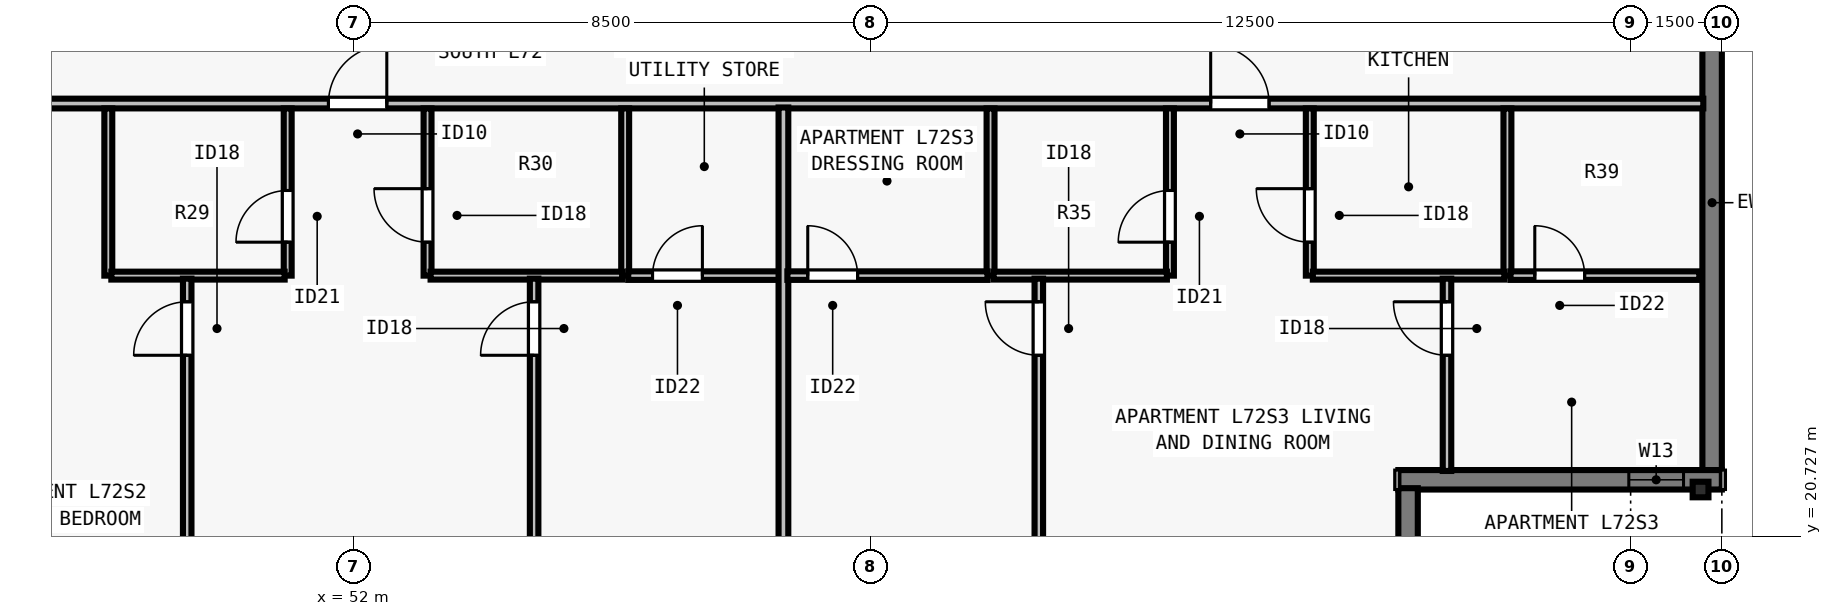
"""IFC4 building model, lengths in metres.
Left out: names, types, materials, properties, quantities, classifications, styles, units other than length and angle.
Written with IfcOpenShell. Run it as: python <this file> out.ifc"""

import sys

from ifc_helpers import new_model, si_unit, direction, frame, frame_2d, origin, origin_2d, place, context, subcontext, project, spatial, rectangle, i_section, extrude, element, fill, save


model = new_model("IFC4")
c1 = context("Model", 3, precision=1e-05, world=origin(), true_north=direction((0.0, 1.0)))
c2 = subcontext(c1, "Body", "Model", "MODEL_VIEW")
j1 = project(units=[si_unit("LENGTHUNIT", "METRE"), si_unit("PLANEANGLEUNIT", "RADIAN")], contexts=[c1])
p1 = place(None, origin())
s1 = spatial("IfcSite", under=j1, at=p1, CompositionType="ELEMENT")
p2 = place(p1, origin())
s2 = spatial("IfcBuilding", under=s1, at=p2, CompositionType="ELEMENT")
p3 = place(p2, frame((0.0, 0.0, 262.0)))
s3 = spatial("IfcBuildingStorey", under=s2, at=p3, CompositionType="ELEMENT", Elevation=262.0)
p4 = place(p3, frame((74.15, 21.5, 0.0), z_axis=(0.0, 0.0, 1.0), x_axis=(0.0, 1.0, 0.0)))
e1 = element("IfcColumn", 1, at=p4, inside=s3, PredefinedType="COLUMN", context=c2, shape_type="SweptSolid", body=[
    extrude(i_section(OverallWidth=0.256, OverallDepth=0.26, WebThickness=0.01, FlangeThickness=0.017, FilletRadius=0.013, at=origin_2d()), origin(), (0.0, 0.0, 1.0), 3.5),
])
p5 = place(p3, frame((74.34, 56.5, 0.0), z_axis=(0.0, 0.0, 1.0), x_axis=(0.0, -1.0, 0.0)))
e2 = element("IfcWall", 2, at=p5, inside=s3, PredefinedType="SOLIDWALL", context=c2, shape_type="SweptSolid", body=[
    extrude(rectangle(XDim=34.702, YDim=0.32, at=frame_2d((17.351, 0.0))), origin(), (0.0, 0.0, 1.0), 3.29),
])
p6 = place(p5, frame((6.738, 0.0, 0.8)))
e3 = element("IfcOpeningElement", 3, at=p6, cuts=e2, PredefinedType="OPENING", context=c2, shape_type="SweptSolid", body=[
    extrude(rectangle(XDim=1.85, YDim=1.678, at=frame_2d((0.925, 0.839))), frame((0.0, 0.17, 0.0), z_axis=(0.0, -1.0, 0.0), x_axis=(1.0, 0.0, 0.0)), (0.0, 0.0, 1.0), 0.34),
])
p7 = place(p5, frame((10.263, 0.0, 0.8)))
e4 = element("IfcOpeningElement", 4, at=p7, cuts=e2, PredefinedType="OPENING", context=c2, shape_type="SweptSolid", body=[
    extrude(rectangle(XDim=1.55, YDim=1.678, at=frame_2d((0.775, 0.839))), frame((0.0, 0.17, 0.0), z_axis=(0.0, -1.0, 0.0), x_axis=(1.0, 0.0, 0.0)), (0.0, 0.0, 1.0), 0.34),
])
p8 = place(p5, frame((18.264, 0.0, 0.8)))
e5 = element("IfcOpeningElement", 5, at=p8, cuts=e2, PredefinedType="OPENING", context=c2, shape_type="SweptSolid", body=[
    extrude(rectangle(XDim=1.55, YDim=1.678, at=frame_2d((0.775, 0.839))), frame((0.0, 0.17, 0.0), z_axis=(0.0, -1.0, 0.0), x_axis=(1.0, 0.0, 0.0)), (0.0, 0.0, 1.0), 0.34),
])
p9 = place(p5, frame((24.164, 0.0, 0.8)))
e6 = element("IfcOpeningElement", 6, at=p9, cuts=e2, PredefinedType="OPENING", context=c2, shape_type="SweptSolid", body=[
    extrude(rectangle(XDim=1.55, YDim=1.678, at=frame_2d((0.775, 0.839))), frame((0.0, 0.17, 0.0), z_axis=(0.0, -1.0, 0.0), x_axis=(1.0, 0.0, 0.0)), (0.0, 0.0, 1.0), 0.34),
])
p10 = place(p5, frame((14.39, 0.0, 0.8)))
e7 = element("IfcOpeningElement", 7, at=p10, cuts=e2, PredefinedType="OPENING", context=c2, shape_type="SweptSolid", body=[
    extrude(rectangle(XDim=0.9, YDim=1.678, at=frame_2d((0.45, 0.839))), frame((0.0, 0.17, 0.0), z_axis=(0.0, -1.0, 0.0), x_axis=(1.0, 0.0, 0.0)), (0.0, 0.0, 1.0), 0.34),
])
p11 = place(p3, frame((74.5, 21.66, 0.0), z_axis=(0.0, 0.0, 1.0), x_axis=(-1.0, 0.0, 0.0)))
e8 = element("IfcWall", 8, at=p11, inside=s3, PredefinedType="SOLIDWALL", context=c2, shape_type="SweptSolid", body=[
    extrude(rectangle(XDim=5.32, YDim=0.32, at=frame_2d((2.66, 0.0))), origin(), (0.0, 0.0, 1.0), 3.29),
])
p12 = place(p11, frame((0.63, 0.0, 0.8)))
e9 = element("IfcOpeningElement", 9, at=p12, cuts=e8, PredefinedType="OPENING", context=c2, shape_type="SweptSolid", body=[
    extrude(rectangle(XDim=0.9, YDim=1.678, at=frame_2d((0.45, 0.839))), frame((0.0, 0.17, 0.0), z_axis=(0.0, -1.0, 0.0), x_axis=(1.0, 0.0, 0.0)), (0.0, 0.0, 1.0), 0.34),
])
p13 = place(p3, frame((69.34, 21.522, 0.0), z_axis=(0.0, 0.0, 1.0), x_axis=(0.0, -1.0, 0.0)))
e10 = element("IfcWall", 10, at=p13, inside=s3, PredefinedType="SOLIDWALL", context=c2, shape_type="SweptSolid", body=[
    extrude(rectangle(XDim=4.724, YDim=0.32, at=frame_2d((2.362, 0.0))), origin(), (0.0, 0.0, 1.0), 3.29),
])
p14 = place(p3, frame((29.805, 27.847, 0.0), z_axis=(0.0, 0.0, 1.0), x_axis=(1.0, 0.0, 0.0)))
e11 = element("IfcWall", 11, at=p14, inside=s3, PredefinedType="PARTITIONING", context=c2, shape_type="SweptSolid", body=[
    extrude(rectangle(XDim=44.39, YDim=0.16, at=frame_2d((22.195, 0.0))), origin(), (0.0, 0.0, 1.0), 2.958),
])
p15 = place(p14, frame((7.206, 0.0, 0.0)))
e12 = element("IfcOpeningElement", 12, at=p15, cuts=e11, PredefinedType="OPENING", context=c2, shape_type="SweptSolid", body=[
    extrude(rectangle(XDim=0.96, YDim=2.18, at=frame_2d((0.48, 1.09))), frame((0.0, 0.09, 0.0), z_axis=(0.0, -1.0, 0.0), x_axis=(1.0, 0.0, 0.0)), (0.0, 0.0, 1.0), 0.18),
])
p16 = place(p14, frame((21.78, 0.0, 0.0)))
e13 = element("IfcOpeningElement", 13, at=p16, cuts=e11, PredefinedType="OPENING", context=c2, shape_type="SweptSolid", body=[
    extrude(rectangle(XDim=0.96, YDim=2.18, at=frame_2d((0.48, 1.09))), frame((0.0, 0.09, 0.0), z_axis=(0.0, -1.0, 0.0), x_axis=(1.0, 0.0, 0.0)), (0.0, 0.0, 1.0), 0.18),
])
p17 = place(p14, frame((36.289, 0.0, 0.0)))
e14 = element("IfcOpeningElement", 14, at=p17, cuts=e11, PredefinedType="OPENING", context=c2, shape_type="SweptSolid", body=[
    extrude(rectangle(XDim=0.96, YDim=2.18, at=frame_2d((0.48, 1.09))), frame((0.0, 0.09, 0.0), z_axis=(0.0, -1.0, 0.0), x_axis=(1.0, 0.0, 0.0)), (0.0, 0.0, 1.0), 0.18),
])
p18 = place(p3, frame((47.965, 25.018, 0.0), z_axis=(0.0, 0.0, 1.0), x_axis=(0.0, 1.0, 0.0)))
e15 = element("IfcWall", 15, at=p18, inside=s3, PredefinedType="PLUMBINGWALL", context=c2, shape_type="SweptSolid", body=[
    extrude(rectangle(XDim=2.75, YDim=0.13, at=frame_2d((1.375, 0.0))), origin(), (0.0, 0.0, 1.0), 3.29),
])
p19 = place(p3, frame((50.915, 25.018, 0.0), z_axis=(0.0, 0.0, 1.0), x_axis=(0.0, 1.0, 0.0)))
e16 = element("IfcWall", 16, at=p19, inside=s3, PredefinedType="PLUMBINGWALL", context=c2, shape_type="SweptSolid", body=[
    extrude(rectangle(XDim=2.75, YDim=0.13, at=frame_2d((1.375, 0.0))), origin(), (0.0, 0.0, 1.0), 3.29),
])
p20 = place(p19, frame((0.55, 0.0, 0.0)))
e17 = element("IfcOpeningElement", 17, at=p20, cuts=e16, PredefinedType="OPENING", context=c2, shape_type="SweptSolid", body=[
    extrude(rectangle(XDim=0.85, YDim=2.08, at=frame_2d((0.425, 1.04))), frame((0.0, 0.075, 0.0), z_axis=(0.0, -1.0, 0.0), x_axis=(1.0, 0.0, 0.0)), (0.0, 0.0, 1.0), 0.15),
])
p21 = place(p3, frame((48.015, 25.018, 0.0), z_axis=(0.0, 0.0, 1.0), x_axis=(1.0, 0.0, 0.0)))
e18 = element("IfcWall", 18, at=p21, inside=s3, PredefinedType="PLUMBINGWALL", context=c2, shape_type="SweptSolid", body=[
    extrude(rectangle(XDim=2.85, YDim=0.13, at=frame_2d((1.425, 0.0))), origin(), (0.0, 0.0, 1.0), 3.29),
])
p22 = place(p3, frame((56.465, 25.018, 0.0), z_axis=(0.0, 0.0, 1.0), x_axis=(0.0, 1.0, 0.0)))
e19 = element("IfcWall", 19, at=p22, inside=s3, PredefinedType="PLUMBINGWALL", context=c2, shape_type="SweptSolid", body=[
    extrude(rectangle(XDim=2.75, YDim=0.13, at=frame_2d((1.375, 0.0))), origin(), (0.0, 0.0, 1.0), 3.29),
])
p23 = place(p3, frame((53.215, 25.018, 0.0), z_axis=(0.0, 0.0, 1.0), x_axis=(0.0, 1.0, 0.0)))
e20 = element("IfcWall", 20, at=p23, inside=s3, PredefinedType="PLUMBINGWALL", context=c2, shape_type="SweptSolid", body=[
    extrude(rectangle(XDim=2.75, YDim=0.13, at=frame_2d((1.375, 0.0))), origin(), (0.0, 0.0, 1.0), 2.958),
])
p24 = place(p23, frame((0.55, 0.0, 0.0)))
e21 = element("IfcOpeningElement", 21, at=p24, cuts=e20, PredefinedType="OPENING", context=c2, shape_type="SweptSolid", body=[
    extrude(rectangle(XDim=0.88, YDim=2.1, at=frame_2d((0.44, 1.05))), frame((0.0, 0.075, 0.0), z_axis=(0.0, -1.0, 0.0), x_axis=(1.0, 0.0, 0.0)), (0.0, 0.0, 1.0), 0.15),
])
p25 = place(p3, frame((53.265, 25.018, 0.0), z_axis=(0.0, 0.0, 1.0), x_axis=(1.0, 0.0, 0.0)))
e22 = element("IfcWall", 22, at=p25, inside=s3, PredefinedType="PLUMBINGWALL", context=c2, shape_type="SweptSolid", body=[
    extrude(rectangle(XDim=3.15, YDim=0.13, at=frame_2d((1.575, 0.0))), origin(), (0.0, 0.0, 1.0), 3.29),
])
p26 = place(p3, frame((49.262, 16.88, 0.0), z_axis=(0.0, 0.0, 1.0), x_axis=(0.0, 1.0, 0.0)))
e23 = element("IfcWall", 23, at=p26, inside=s3, PredefinedType="PARTITIONING", context=c2, shape_type="SweptSolid", body=[
    extrude(rectangle(XDim=8.088, YDim=0.14, at=frame_2d((4.044, 0.0))), origin(), (0.0, 0.0, 1.0), 2.958),
])
p27 = place(p26, frame((6.827, 0.0, 0.0)))
e24 = element("IfcOpeningElement", 24, at=p27, cuts=e23, PredefinedType="OPENING", context=c2, shape_type="SweptSolid", body=[
    extrude(rectangle(XDim=0.88, YDim=2.1, at=frame_2d((0.44, 1.05))), frame((0.0, 0.08, 0.0), z_axis=(0.0, -1.0, 0.0), x_axis=(1.0, 0.0, 0.0)), (0.0, 0.0, 1.0), 0.16),
])
p28 = place(p3, frame((54.968, 16.88, 0.0), z_axis=(0.0, 0.0, 1.0), x_axis=(0.0, 1.0, 0.0)))
e25 = element("IfcWall", 25, at=p28, inside=s3, PredefinedType="PARTITIONING", context=c2, shape_type="SweptSolid", body=[
    extrude(rectangle(XDim=8.088, YDim=0.14, at=frame_2d((4.044, 0.0))), origin(), (0.0, 0.0, 1.0), 3.29),
])
p29 = place(p28, frame((6.827, 0.0, 0.0)))
e26 = element("IfcOpeningElement", 26, at=p29, cuts=e25, PredefinedType="OPENING", context=c2, shape_type="SweptSolid", body=[
    extrude(rectangle(XDim=0.88, YDim=2.1, at=frame_2d((0.44, 1.05))), frame((0.0, 0.08, 0.0), z_axis=(0.0, -1.0, 0.0), x_axis=(1.0, 0.0, 0.0)), (0.0, 0.0, 1.0), 0.16),
])
p30 = place(p3, frame((56.515, 25.018, 0.0), z_axis=(0.0, 0.0, 1.0), x_axis=(1.0, 0.0, 0.0)))
e27 = element("IfcWall", 27, at=p30, inside=s3, PredefinedType="PARTITIONING", context=c2, shape_type="SweptSolid", body=[
    extrude(rectangle(XDim=2.603, YDim=0.14, at=frame_2d((1.301, 0.0))), origin(), (0.0, 0.0, 1.0), 3.29),
])
p31 = place(p30, frame((0.4, 0.0, 0.0)))
e28 = element("IfcOpeningElement", 28, at=p31, cuts=e27, PredefinedType="OPENING", context=c2, shape_type="SweptSolid", body=[
    extrude(rectangle(XDim=0.82, YDim=2.1, at=frame_2d((0.41, 1.05))), frame((0.0, 0.08, 0.0), z_axis=(0.0, -1.0, 0.0), x_axis=(1.0, 0.0, 0.0)), (0.0, 0.0, 1.0), 0.16),
])
p32 = place(p3, frame((59.067, 16.805, 0.0), z_axis=(0.0, 0.0, 1.0), x_axis=(0.0, 1.0, 0.0)))
e29 = element("IfcWall", 29, at=p32, inside=s3, PredefinedType="PARTITIONING", context=c2, shape_type="SweptSolid", body=[
    extrude(rectangle(XDim=10.978, YDim=0.16, at=frame_2d((5.489, 0.0))), origin(), (0.0, 0.0, 1.0), 3.29),
])
p33 = place(p3, frame((62.474, 25.018, 0.0), z_axis=(0.0, 0.0, 1.0), x_axis=(0.0, 1.0, 0.0)))
e30 = element("IfcWall", 30, at=p33, inside=s3, PredefinedType="PLUMBINGWALL", context=c2, shape_type="SweptSolid", body=[
    extrude(rectangle(XDim=2.75, YDim=0.13, at=frame_2d((1.375, 0.0))), origin(), (0.0, 0.0, 1.0), 2.573),
])
p34 = place(p3, frame((65.424, 25.018, 0.0), z_axis=(0.0, 0.0, 1.0), x_axis=(0.0, 1.0, 0.0)))
e31 = element("IfcWall", 31, at=p34, inside=s3, PredefinedType="PLUMBINGWALL", context=c2, shape_type="SweptSolid", body=[
    extrude(rectangle(XDim=2.75, YDim=0.13, at=frame_2d((1.375, 0.0))), origin(), (0.0, 0.0, 1.0), 3.29),
])
p35 = place(p34, frame((0.55, 0.0, 0.0)))
e32 = element("IfcOpeningElement", 32, at=p35, cuts=e31, PredefinedType="OPENING", context=c2, shape_type="SweptSolid", body=[
    extrude(rectangle(XDim=0.85, YDim=2.08, at=frame_2d((0.425, 1.04))), frame((0.0, 0.075, 0.0), z_axis=(0.0, -1.0, 0.0), x_axis=(1.0, 0.0, 0.0)), (0.0, 0.0, 1.0), 0.15),
])
p36 = place(p3, frame((62.524, 25.018, 0.0), z_axis=(0.0, 0.0, 1.0), x_axis=(1.0, 0.0, 0.0)))
e33 = element("IfcWall", 33, at=p36, inside=s3, PredefinedType="PLUMBINGWALL", context=c2, shape_type="SweptSolid", body=[
    extrude(rectangle(XDim=2.85, YDim=0.13, at=frame_2d((1.425, 0.0))), origin(), (0.0, 0.0, 1.0), 3.29),
])
p37 = place(p3, frame((70.974, 25.018, 0.0), z_axis=(0.0, 0.0, 1.0), x_axis=(0.0, 1.0, 0.0)))
e34 = element("IfcWall", 34, at=p37, inside=s3, PredefinedType="PLUMBINGWALL", context=c2, shape_type="SweptSolid", body=[
    extrude(rectangle(XDim=2.75, YDim=0.13, at=frame_2d((1.375, 0.0))), origin(), (0.0, 0.0, 1.0), 3.29),
])
p38 = place(p3, frame((67.724, 25.018, 0.0), z_axis=(0.0, 0.0, 1.0), x_axis=(0.0, 1.0, 0.0)))
e35 = element("IfcWall", 35, at=p38, inside=s3, PredefinedType="PLUMBINGWALL", context=c2, shape_type="SweptSolid", body=[
    extrude(rectangle(XDim=2.75, YDim=0.13, at=frame_2d((1.375, 0.0))), origin(), (0.0, 0.0, 1.0), 3.29),
])
p39 = place(p38, frame((0.55, 0.0, 0.0)))
e36 = element("IfcOpeningElement", 36, at=p39, cuts=e35, PredefinedType="OPENING", context=c2, shape_type="SweptSolid", body=[
    extrude(rectangle(XDim=0.88, YDim=2.1, at=frame_2d((0.44, 1.05))), frame((0.0, 0.075, 0.0), z_axis=(0.0, -1.0, 0.0), x_axis=(1.0, 0.0, 0.0)), (0.0, 0.0, 1.0), 0.15),
])
p40 = place(p3, frame((67.774, 25.018, 0.0), z_axis=(0.0, 0.0, 1.0), x_axis=(1.0, 0.0, 0.0)))
e37 = element("IfcWall", 37, at=p40, inside=s3, PredefinedType="PLUMBINGWALL", context=c2, shape_type="SweptSolid", body=[
    extrude(rectangle(XDim=3.15, YDim=0.13, at=frame_2d((1.575, 0.0))), origin(), (0.0, 0.0, 1.0), 2.958),
])
p41 = place(p3, frame((63.268, 16.88, 0.0), z_axis=(0.0, 0.0, 1.0), x_axis=(0.0, 1.0, 0.0)))
e38 = element("IfcWall", 38, at=p41, inside=s3, PredefinedType="PARTITIONING", context=c2, shape_type="SweptSolid", body=[
    extrude(rectangle(XDim=8.088, YDim=0.14, at=frame_2d((4.044, 0.0))), origin(), (0.0, 0.0, 1.0), 3.29),
])
p42 = place(p41, frame((6.827, 0.0, 0.0)))
e39 = element("IfcOpeningElement", 39, at=p42, cuts=e38, PredefinedType="OPENING", context=c2, shape_type="SweptSolid", body=[
    extrude(rectangle(XDim=0.88, YDim=2.1, at=frame_2d((0.44, 1.05))), frame((0.0, 0.08, 0.0), z_axis=(0.0, -1.0, 0.0), x_axis=(1.0, 0.0, 0.0)), (0.0, 0.0, 1.0), 0.16),
])
p43 = place(p3, frame((59.133, 25.018, 0.0), z_axis=(0.0, 0.0, 1.0), x_axis=(1.0, 0.0, 0.0)))
e40 = element("IfcWall", 40, at=p43, inside=s3, PredefinedType="PARTITIONING", context=c2, shape_type="SweptSolid", body=[
    extrude(rectangle(XDim=3.291, YDim=0.14, at=frame_2d((1.646, 0.0))), origin(), (0.0, 0.0, 1.0), 3.29),
])
p44 = place(p43, frame((0.335, 0.0, 0.0)))
e41 = element("IfcOpeningElement", 41, at=p44, cuts=e40, PredefinedType="OPENING", context=c2, shape_type="SweptSolid", body=[
    extrude(rectangle(XDim=0.82, YDim=2.1, at=frame_2d((0.41, 1.05))), frame((0.0, 0.08, 0.0), z_axis=(0.0, -1.0, 0.0), x_axis=(1.0, 0.0, 0.0)), (0.0, 0.0, 1.0), 0.16),
])
p45 = place(p3, frame((69.98, 21.805, 0.0), z_axis=(0.0, 0.0, 1.0), x_axis=(0.0, 1.0, 0.0)))
e42 = element("IfcWall", 42, at=p45, inside=s3, PredefinedType="PARTITIONING", context=c2, shape_type="SweptSolid", body=[
    extrude(rectangle(XDim=3.163, YDim=0.14, at=frame_2d((1.581, 0.0))), origin(), (0.0, 0.0, 1.0), 3.29),
])
p46 = place(p45, frame((1.903, 0.0, 0.0)))
e43 = element("IfcOpeningElement", 43, at=p46, cuts=e42, PredefinedType="OPENING", context=c2, shape_type="SweptSolid", body=[
    extrude(rectangle(XDim=0.88, YDim=2.1, at=frame_2d((0.44, 1.05))), frame((0.0, 0.08, 0.0), z_axis=(0.0, -1.0, 0.0), x_axis=(1.0, 0.0, 0.0)), (0.0, 0.0, 1.0), 0.16),
])
p47 = place(p3, frame((71.024, 25.018, 0.0), z_axis=(0.0, 0.0, 1.0), x_axis=(1.0, 0.0, 0.0)))
e44 = element("IfcWall", 44, at=p47, inside=s3, PredefinedType="PARTITIONING", context=c2, shape_type="SweptSolid", body=[
    extrude(rectangle(XDim=3.106, YDim=0.14, at=frame_2d((1.553, 0.0))), origin(), (0.0, 0.0, 1.0), 3.29),
])
p48 = place(p47, frame((0.4, 0.0, 0.0)))
e45 = element("IfcOpeningElement", 45, at=p48, cuts=e44, PredefinedType="OPENING", context=c2, shape_type="SweptSolid", body=[
    extrude(rectangle(XDim=0.82, YDim=2.1, at=frame_2d((0.41, 1.05))), frame((0.0, 0.08, 0.0), z_axis=(0.0, -1.0, 0.0), x_axis=(1.0, 0.0, 0.0)), (0.0, 0.0, 1.0), 0.16),
])
p49 = place(p12, origin())
e46 = element("IfcWindow", 46, at=p49, inside=s3, PartitioningType="SINGLE_PANEL", PredefinedType="WINDOW", context=c2, shape_type="SweptSolid", body=[
    extrude(rectangle(XDim=0.9, YDim=1.678, at=frame_2d((0.45, 0.839))), frame((0.0, -0.04, 0.0), z_axis=(0.0, -1.0, 0.0), x_axis=(1.0, 0.0, 0.0)), (0.0, 0.0, 1.0), 0.06),
])
fill(e9, e46)
p50 = place(p20, origin())
e47 = element("IfcDoor", 47, at=p50, inside=s3, OperationType="SINGLE_SWING_LEFT", PredefinedType="DOOR", context=c2, shape_type="SweptSolid", body=[
    extrude(rectangle(XDim=0.85, YDim=2.08, at=frame_2d((0.425, 1.04))), frame((0.0, 0.025, 0.0), z_axis=(0.0, -1.0, 0.0), x_axis=(1.0, 0.0, 0.0)), (0.0, 0.0, 1.0), 0.05),
])
fill(e17, e47)
p51 = place(p24, origin())
e48 = element("IfcDoor", 48, at=p51, inside=s3, OperationType="SINGLE_SWING_RIGHT", PredefinedType="DOOR", context=c2, shape_type="SweptSolid", body=[
    extrude(rectangle(XDim=0.88, YDim=2.1, at=frame_2d((0.44, 1.05))), frame((0.0, 0.025, 0.0), z_axis=(0.0, -1.0, 0.0), x_axis=(1.0, 0.0, 0.0)), (0.0, 0.0, 1.0), 0.05),
])
fill(e21, e48)
p52 = place(p27, origin())
e49 = element("IfcDoor", 49, at=p52, inside=s3, OperationType="SINGLE_SWING_LEFT", PredefinedType="DOOR", context=c2, shape_type="SweptSolid", body=[
    extrude(rectangle(XDim=0.88, YDim=2.1, at=frame_2d((0.44, 1.05))), frame((0.0, 0.025, 0.0), z_axis=(0.0, -1.0, 0.0), x_axis=(1.0, 0.0, 0.0)), (0.0, 0.0, 1.0), 0.05),
])
fill(e24, e49)
p53 = place(p31, origin())
e50 = element("IfcDoor", 50, at=p53, inside=s3, OperationType="SINGLE_SWING_RIGHT", PredefinedType="DOOR", context=c2, shape_type="SweptSolid", body=[
    extrude(rectangle(XDim=0.82, YDim=2.1, at=frame_2d((0.41, 1.05))), frame((0.0, 0.025, 0.0), z_axis=(0.0, -1.0, 0.0), x_axis=(1.0, 0.0, 0.0)), (0.0, 0.0, 1.0), 0.05),
])
fill(e28, e50)
p54 = place(p29, origin())
e51 = element("IfcDoor", 51, at=p54, inside=s3, OperationType="SINGLE_SWING_LEFT", PredefinedType="DOOR", context=c2, shape_type="SweptSolid", body=[
    extrude(rectangle(XDim=0.88, YDim=2.1, at=frame_2d((0.44, 1.05))), frame((0.0, 0.025, 0.0), z_axis=(0.0, -1.0, 0.0), x_axis=(1.0, 0.0, 0.0)), (0.0, 0.0, 1.0), 0.05),
])
fill(e26, e51)
p55 = place(p16, origin())
e52 = element("IfcDoor", 52, at=p55, inside=s3, OperationType="SINGLE_SWING_RIGHT", PredefinedType="DOOR", context=c2, shape_type="SweptSolid", body=[
    extrude(rectangle(XDim=0.96, YDim=2.18, at=frame_2d((0.48, 1.09))), frame((0.0, 0.025, 0.0), z_axis=(0.0, -1.0, 0.0), x_axis=(1.0, 0.0, 0.0)), (0.0, 0.0, 1.0), 0.05),
])
fill(e13, e52)
p56 = place(p35, origin())
e53 = element("IfcDoor", 53, at=p56, inside=s3, OperationType="SINGLE_SWING_LEFT", PredefinedType="DOOR", context=c2, shape_type="SweptSolid", body=[
    extrude(rectangle(XDim=0.85, YDim=2.08, at=frame_2d((0.425, 1.04))), frame((0.0, 0.025, 0.0), z_axis=(0.0, -1.0, 0.0), x_axis=(1.0, 0.0, 0.0)), (0.0, 0.0, 1.0), 0.05),
])
fill(e32, e53)
p57 = place(p39, origin())
e54 = element("IfcDoor", 54, at=p57, inside=s3, OperationType="SINGLE_SWING_RIGHT", PredefinedType="DOOR", context=c2, shape_type="SweptSolid", body=[
    extrude(rectangle(XDim=0.88, YDim=2.1, at=frame_2d((0.44, 1.05))), frame((0.0, 0.025, 0.0), z_axis=(0.0, -1.0, 0.0), x_axis=(1.0, 0.0, 0.0)), (0.0, 0.0, 1.0), 0.05),
])
fill(e36, e54)
p58 = place(p44, origin())
e55 = element("IfcDoor", 55, at=p58, inside=s3, OperationType="SINGLE_SWING_LEFT", PredefinedType="DOOR", context=c2, shape_type="SweptSolid", body=[
    extrude(rectangle(XDim=0.82, YDim=2.1, at=frame_2d((0.41, 1.05))), frame((0.0, 0.025, 0.0), z_axis=(0.0, -1.0, 0.0), x_axis=(1.0, 0.0, 0.0)), (0.0, 0.0, 1.0), 0.05),
])
fill(e41, e55)
p59 = place(p42, origin())
e56 = element("IfcDoor", 56, at=p59, inside=s3, OperationType="SINGLE_SWING_RIGHT", PredefinedType="DOOR", context=c2, shape_type="SweptSolid", body=[
    extrude(rectangle(XDim=0.88, YDim=2.1, at=frame_2d((0.44, 1.05))), frame((0.0, 0.025, 0.0), z_axis=(0.0, -1.0, 0.0), x_axis=(1.0, 0.0, 0.0)), (0.0, 0.0, 1.0), 0.05),
])
fill(e39, e56)
p60 = place(p48, origin())
e57 = element("IfcDoor", 57, at=p60, inside=s3, OperationType="SINGLE_SWING_LEFT", PredefinedType="DOOR", context=c2, shape_type="SweptSolid", body=[
    extrude(rectangle(XDim=0.82, YDim=2.1, at=frame_2d((0.41, 1.05))), frame((0.0, 0.025, 0.0), z_axis=(0.0, -1.0, 0.0), x_axis=(1.0, 0.0, 0.0)), (0.0, 0.0, 1.0), 0.05),
])
fill(e45, e57)
p61 = place(p46, origin())
e58 = element("IfcDoor", 58, at=p61, inside=s3, OperationType="SINGLE_SWING_RIGHT", PredefinedType="DOOR", context=c2, shape_type="SweptSolid", body=[
    extrude(rectangle(XDim=0.88, YDim=2.1, at=frame_2d((0.44, 1.05))), frame((0.0, 0.025, 0.0), z_axis=(0.0, -1.0, 0.0), x_axis=(1.0, 0.0, 0.0)), (0.0, 0.0, 1.0), 0.05),
])
fill(e43, e58)
p62 = place(p17, origin())
e59 = element("IfcDoor", 59, at=p62, inside=s3, OperationType="SINGLE_SWING_LEFT", PredefinedType="DOOR", context=c2, shape_type="SweptSolid", body=[
    extrude(rectangle(XDim=0.96, YDim=2.18, at=frame_2d((0.48, 1.09))), frame((0.0, 0.025, 0.0), z_axis=(0.0, -1.0, 0.0), x_axis=(1.0, 0.0, 0.0)), (0.0, 0.0, 1.0), 0.05),
])
fill(e14, e59)
save(model, sys.argv[1])
